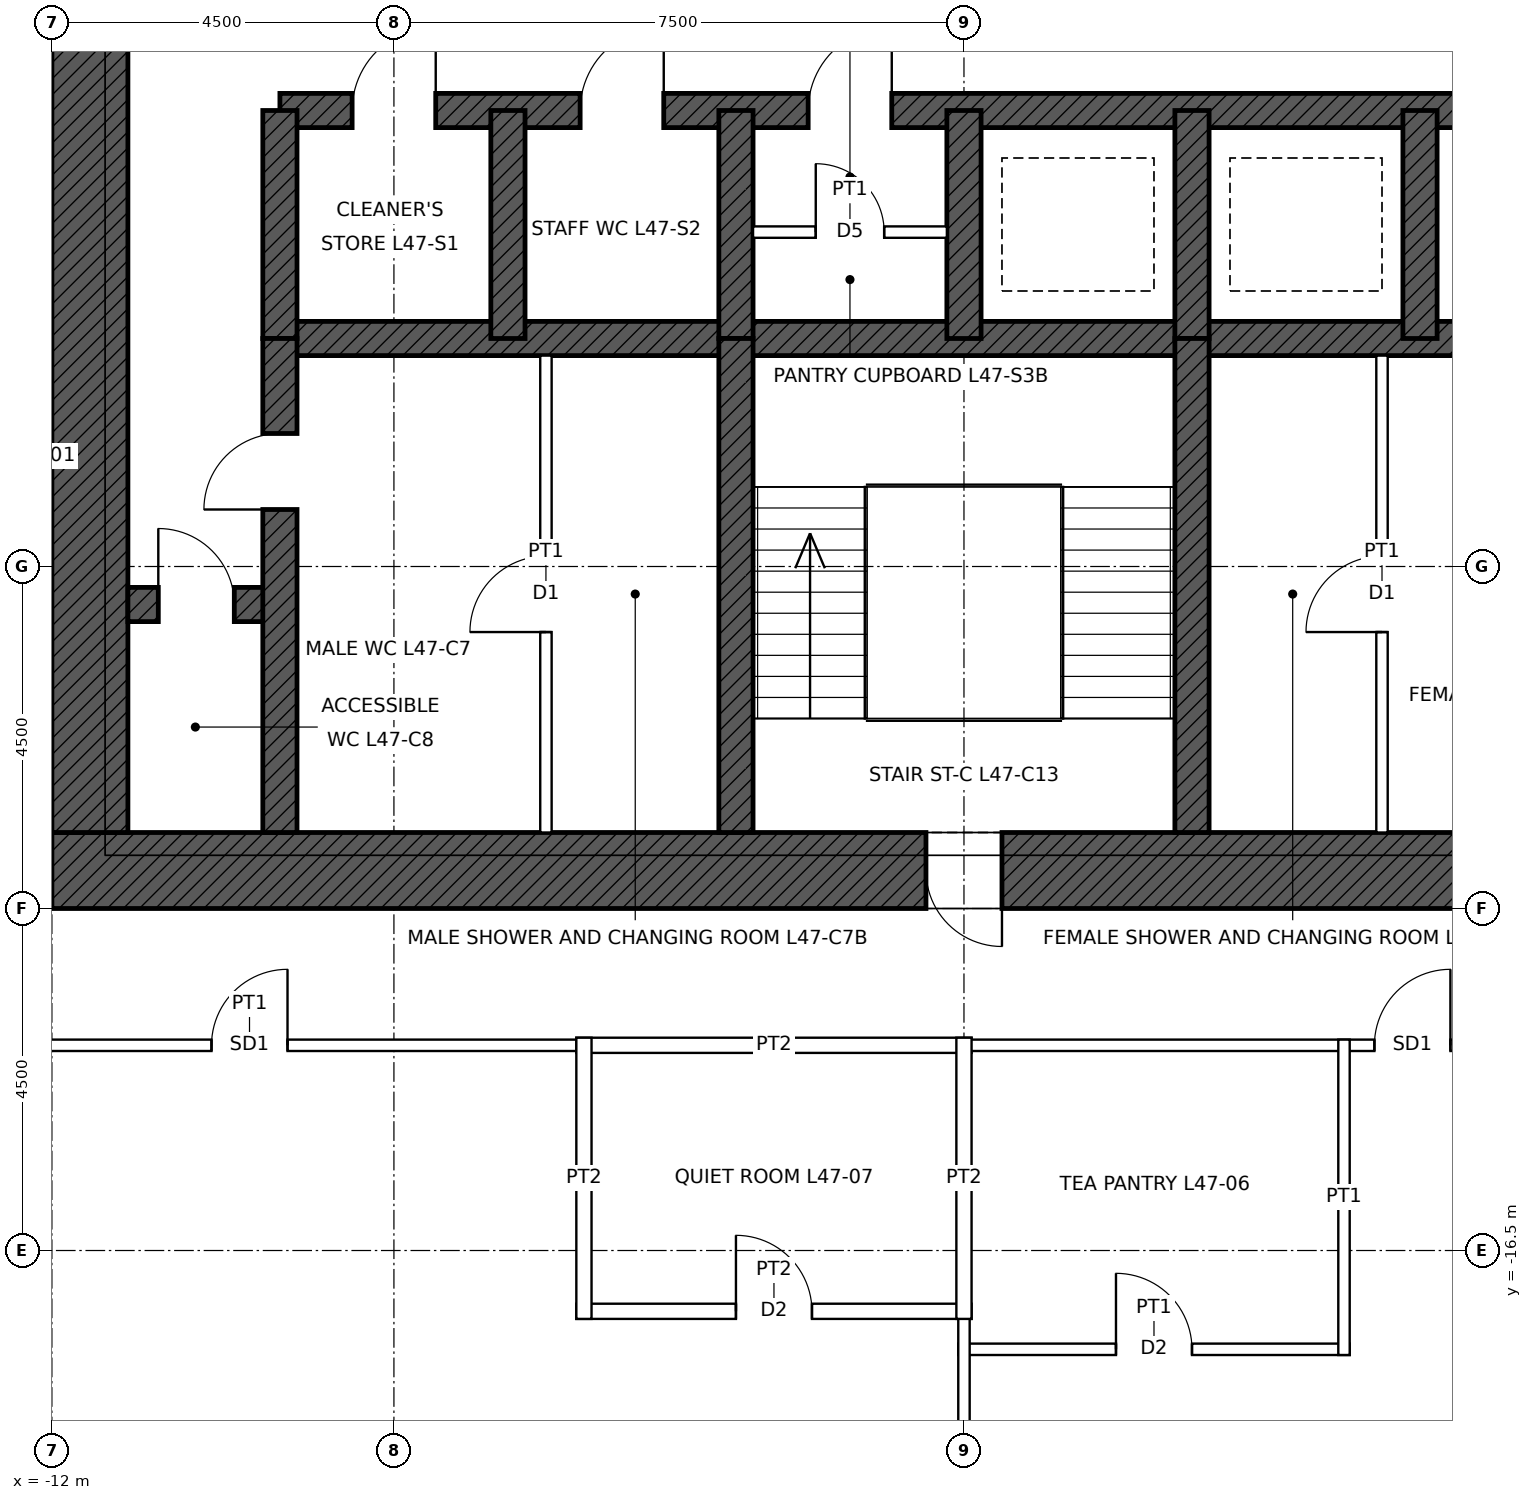
"""IFC4 building model, lengths in metres.
Left out: names, types, materials, properties, quantities, classifications, styles, units other than length and angle.
Written with IfcOpenShell. Run it as: python <this file> out.ifc"""

import sys

from ifc_helpers import new_model, si_unit, direction, frame, frame_2d, origin, place, context, subcontext, project, spatial, rectangle, extrude, element, fill, save


model = new_model("IFC4")
c1 = context("Model", 3, precision=1e-05, world=origin(), true_north=direction((0.0, 1.0)))
c2 = subcontext(c1, "Body", "Model", "MODEL_VIEW")
j1 = project(units=[si_unit("LENGTHUNIT", "METRE"), si_unit("PLANEANGLEUNIT", "RADIAN")], contexts=[c1])
p1 = place(None, origin())
s1 = spatial("IfcSite", under=j1, at=p1, CompositionType="ELEMENT")
p2 = place(p1, origin())
s2 = spatial("IfcBuilding", under=s1, at=p2, CompositionType="ELEMENT")
p3 = place(p2, frame((0.0, 0.0, 221.9)))
s3 = spatial("IfcBuildingStorey", under=s2, at=p3, CompositionType="ELEMENT", Elevation=221.9)
p4 = place(p3, frame((12.0, -11.5, 0.0), z_axis=(0.0, 0.0, 1.0), x_axis=(-1.0, 0.0, 0.0)))
e1 = element("IfcWall", 1, at=p4, inside=s3, PredefinedType="SHEAR", context=c2, shape_type="SweptSolid", body=[
    extrude(rectangle(XDim=24.0, YDim=1.0, at=frame_2d((12.0, 0.0))), origin(), (0.0, 0.0, 1.0), 4.0),
])
p5 = place(p4, frame((11.5, 0.0, 0.0)))
e2 = element("IfcOpeningElement", 2, at=p5, cuts=e1, PredefinedType="OPENING", context=c2, shape_type="SweptSolid", body=[
    extrude(rectangle(XDim=1.0, YDim=2.1, at=frame_2d((0.5, 1.05))), frame((0.0, 0.51, 0.0), z_axis=(0.0, -1.0, 0.0), x_axis=(1.0, 0.0, 0.0)), (0.0, 0.0, 1.0), 1.02),
])
p6 = place(p4, frame((1.0, 0.0, 0.0)))
e3 = element("IfcOpeningElement", 3, at=p6, cuts=e1, PredefinedType="OPENING", context=c2, shape_type="SweptSolid", body=[
    extrude(rectangle(XDim=1.0, YDim=2.4, at=frame_2d((0.5, 1.2))), frame((0.0, 0.51, 0.0), z_axis=(0.0, -1.0, 0.0), x_axis=(1.0, 0.0, 0.0)), (0.0, 0.0, 1.0), 1.02),
])
p7 = place(p3, frame((-11.5, -11.0, 0.0), z_axis=(0.0, 0.0, 1.0), x_axis=(0.0, 1.0, 0.0)))
e4 = element("IfcWall", 4, at=p7, inside=s3, PredefinedType="SHEAR", context=c2, shape_type="SweptSolid", body=[
    extrude(rectangle(XDim=22.0, YDim=1.0, at=frame_2d((11.0, 0.0))), origin(), (0.0, 0.0, 1.0), 4.0),
])
p8 = place(p7, frame((10.5, 0.0, 0.0)))
e5 = element("IfcOpeningElement", 5, at=p8, cuts=e4, PredefinedType="OPENING", context=c2, shape_type="SweptSolid", body=[
    extrude(rectangle(XDim=1.0, YDim=2.4, at=frame_2d((0.5, 1.2))), frame((0.0, 0.51, 0.0), z_axis=(0.0, -1.0, 0.0), x_axis=(1.0, 0.0, 0.0)), (0.0, 0.0, 1.0), 1.02),
])
p9 = place(p3, frame((-9.0, -1.5, 0.0), z_axis=(0.0, 0.0, 1.0), x_axis=(1.0, 0.0, 0.0)))
e6 = element("IfcWall", 6, at=p9, inside=s3, PredefinedType="SHEAR", context=c2, shape_type="SweptSolid", body=[
    extrude(rectangle(XDim=18.0, YDim=0.45, at=frame_2d((9.0, 0.0))), origin(), (0.0, 0.0, 1.0), 4.0),
])
p10 = place(p9, frame((0.95, 0.0, 0.0)))
e7 = element("IfcOpeningElement", 7, at=p10, cuts=e6, PredefinedType="OPENING", context=c2, shape_type="SweptSolid", body=[
    extrude(rectangle(XDim=1.1, YDim=2.1, at=frame_2d((0.55, 1.05))), frame((0.0, 0.235, 0.0), z_axis=(0.0, -1.0, 0.0), x_axis=(1.0, 0.0, 0.0)), (0.0, 0.0, 1.0), 0.47),
])
p11 = place(p9, frame((3.95, 0.0, 0.0)))
e8 = element("IfcOpeningElement", 8, at=p11, cuts=e6, PredefinedType="OPENING", context=c2, shape_type="SweptSolid", body=[
    extrude(rectangle(XDim=1.1, YDim=2.1, at=frame_2d((0.55, 1.05))), frame((0.0, 0.235, 0.0), z_axis=(0.0, -1.0, 0.0), x_axis=(1.0, 0.0, 0.0)), (0.0, 0.0, 1.0), 0.47),
])
p12 = place(p9, frame((6.95, 0.0, 0.0)))
e9 = element("IfcOpeningElement", 9, at=p12, cuts=e6, PredefinedType="OPENING", context=c2, shape_type="SweptSolid", body=[
    extrude(rectangle(XDim=1.1, YDim=2.1, at=frame_2d((0.55, 1.05))), frame((0.0, 0.235, 0.0), z_axis=(0.0, -1.0, 0.0), x_axis=(1.0, 0.0, 0.0)), (0.0, 0.0, 1.0), 0.47),
])
p13 = place(p3, frame((-9.0, -4.5, 0.0), z_axis=(0.0, 0.0, 1.0), x_axis=(1.0, 0.0, 0.0)))
e10 = element("IfcWall", 10, at=p13, inside=s3, PredefinedType="SHEAR", context=c2, shape_type="SweptSolid", body=[
    extrude(rectangle(XDim=18.0, YDim=0.45, at=frame_2d((9.0, 0.0))), origin(), (0.0, 0.0, 1.0), 4.0),
])
p14 = place(p3, frame((-11.0, -8.0, 0.0), z_axis=(0.0, 0.0, 1.0), x_axis=(1.0, 0.0, 0.0)))
e11 = element("IfcWall", 11, at=p14, inside=s3, PredefinedType="SHEAR", context=c2, shape_type="SweptSolid", body=[
    extrude(rectangle(XDim=2.0, YDim=0.45, at=frame_2d((1.0, 0.0))), origin(), (0.0, 0.0, 1.0), 4.0),
])
p15 = place(p14, frame((0.4, 0.0, 0.0)))
e12 = element("IfcOpeningElement", 12, at=p15, cuts=e11, PredefinedType="OPENING", context=c2, shape_type="SweptSolid", body=[
    extrude(rectangle(XDim=1.0, YDim=2.1, at=frame_2d((0.5, 1.05))), frame((0.0, 0.235, 0.0), z_axis=(0.0, -1.0, 0.0), x_axis=(1.0, 0.0, 0.0)), (0.0, 0.0, 1.0), 0.47),
])
for number, where, z_axis, x_axis in (
    (13, (-9.0, -4.5, 0.0), (0.0, 0.0, 1.0), (0.0, 1.0, 0.0)),
    (14, (-6.0, -4.5, 0.0), (0.0, 0.0, 1.0), (0.0, 1.0, 0.0)),
    (15, (-3.0, -4.5, 0.0), (0.0, 0.0, 1.0), (0.0, 1.0, 0.0)),
    (16, (0.0, -4.5, 0.0), (0.0, 0.0, 1.0), (0.0, 1.0, 0.0)),
    (17, (3.0, -4.5, 0.0), (0.0, 0.0, 1.0), (0.0, 1.0, 0.0)),
    (18, (6.0, -4.5, 0.0), (0.0, 0.0, 1.0), (0.0, 1.0, 0.0)),
):
    element("IfcWall", number, at=place(p3, frame(where, z_axis=z_axis, x_axis=x_axis)), inside=s3, PredefinedType="SHEAR", context=c2, shape_type="SweptSolid", body=[
        extrude(rectangle(XDim=3.0, YDim=0.45, at=frame_2d((1.5, 0.0))), origin(), (0.0, 0.0, 1.0), 4.0),
    ])
p16 = place(p3, frame((-9.0, -11.0, 0.0), z_axis=(0.0, 0.0, 1.0), x_axis=(0.0, 1.0, 0.0)))
e19 = element("IfcWall", 19, at=p16, inside=s3, PredefinedType="SHEAR", context=c2, shape_type="SweptSolid", body=[
    extrude(rectangle(XDim=6.5, YDim=0.45, at=frame_2d((3.25, 0.0))), origin(), (0.0, 0.0, 1.0), 4.0),
])
p17 = place(p16, frame((4.25, 0.0, 0.0)))
e20 = element("IfcOpeningElement", 20, at=p17, cuts=e19, PredefinedType="OPENING", context=c2, shape_type="SweptSolid", body=[
    extrude(rectangle(XDim=1.0, YDim=2.1, at=frame_2d((0.5, 1.05))), frame((0.0, 0.235, 0.0), z_axis=(0.0, -1.0, 0.0), x_axis=(1.0, 0.0, 0.0)), (0.0, 0.0, 1.0), 0.47),
])
for number, where, z_axis, x_axis in (
    (21, (-3.0, -11.0, 0.0), (0.0, 0.0, 1.0), (0.0, 1.0, 0.0)),
    (22, (3.0, -11.0, 0.0), (0.0, 0.0, 1.0), (0.0, 1.0, 0.0)),
):
    element("IfcWall", number, at=place(p3, frame(where, z_axis=z_axis, x_axis=x_axis)), inside=s3, PredefinedType="SHEAR", context=c2, shape_type="SweptSolid", body=[
        extrude(rectangle(XDim=6.5, YDim=0.45, at=frame_2d((3.25, 0.0))), origin(), (0.0, 0.0, 1.0), 4.0),
    ])
p18 = place(p3, frame((-0.075, -17.8, 0.0), z_axis=(0.0, 0.0, 1.0), x_axis=(1.0, 0.0, 0.0)))
e23 = element("IfcWall", 23, at=p18, inside=s3, PredefinedType="PARTITIONING", context=c2, shape_type="SweptSolid", body=[
    extrude(rectangle(XDim=5.15, YDim=0.15, at=frame_2d((2.575, 0.0))), origin(), (0.0, 0.0, 1.0), 3.85),
])
p19 = place(p18, frame((2.075, 0.0, 0.0)))
e24 = element("IfcOpeningElement", 24, at=p19, cuts=e23, PredefinedType="OPENING", context=c2, shape_type="SweptSolid", body=[
    extrude(rectangle(XDim=1.0, YDim=2.1, at=frame_2d((0.5, 1.05))), frame((0.0, 0.085, 0.0), z_axis=(0.0, -1.0, 0.0), x_axis=(1.0, 0.0, 0.0)), (0.0, 0.0, 1.0), 0.17),
])
p20 = place(p3, frame((-5.1, -17.3, 0.0), z_axis=(0.0, 0.0, 1.0), x_axis=(1.0, 0.0, 0.0)))
e25 = element("IfcWall", 25, at=p20, inside=s3, PredefinedType="PARTITIONING", context=c2, shape_type="SweptSolid", body=[
    extrude(rectangle(XDim=5.2, YDim=0.2, at=frame_2d((2.6, 0.0))), origin(), (0.0, 0.0, 1.0), 3.85),
])
p21 = place(p20, frame((2.1, 0.0, 0.0)))
e26 = element("IfcOpeningElement", 26, at=p21, cuts=e25, PredefinedType="OPENING", context=c2, shape_type="SweptSolid", body=[
    extrude(rectangle(XDim=1.0, YDim=2.1, at=frame_2d((0.5, 1.05))), frame((0.0, 0.11, 0.0), z_axis=(0.0, -1.0, 0.0), x_axis=(1.0, 0.0, 0.0)), (0.0, 0.0, 1.0), 0.22),
])
p22 = place(p3, frame((-13.875, -13.8, 0.0), z_axis=(0.0, 0.0, 1.0), x_axis=(1.0, 0.0, 0.0)))
e27 = element("IfcWall", 27, at=p22, inside=s3, PredefinedType="PARTITIONING", context=c2, shape_type="SweptSolid", body=[
    extrude(rectangle(XDim=8.95, YDim=0.15, at=frame_2d((4.475, 0.0))), origin(), (0.0, 0.0, 1.0), 3.85),
])
p23 = place(p22, frame((3.975, 0.0, 0.0)))
e28 = element("IfcOpeningElement", 28, at=p23, cuts=e27, PredefinedType="OPENING", context=c2, shape_type="SweptSolid", body=[
    extrude(rectangle(XDim=1.0, YDim=2.4, at=frame_2d((0.5, 1.2))), frame((0.0, 0.085, 0.0), z_axis=(0.0, -1.0, 0.0), x_axis=(1.0, 0.0, 0.0)), (0.0, 0.0, 1.0), 0.17),
])
p24 = place(p3, frame((-5.1, -13.8, 0.0), z_axis=(0.0, 0.0, 1.0), x_axis=(1.0, 0.0, 0.0)))
e29 = element("IfcWall", 29, at=p24, inside=s3, PredefinedType="PARTITIONING", context=c2, shape_type="SweptSolid", body=[
    extrude(rectangle(XDim=5.2, YDim=0.2, at=frame_2d((2.6, 0.0))), origin(), (0.0, 0.0, 1.0), 3.85),
])
p25 = place(p3, frame((-0.075, -13.8, 0.0), z_axis=(0.0, 0.0, 1.0), x_axis=(1.0, 0.0, 0.0)))
e30 = element("IfcWall", 30, at=p25, inside=s3, PredefinedType="PARTITIONING", context=c2, shape_type="SweptSolid", body=[
    extrude(rectangle(XDim=13.95, YDim=0.15, at=frame_2d((6.975, 0.0))), origin(), (0.0, 0.0, 1.0), 3.85),
])
p26 = place(p25, frame((5.475, 0.0, 0.0)))
e31 = element("IfcOpeningElement", 31, at=p26, cuts=e30, PredefinedType="OPENING", context=c2, shape_type="SweptSolid", body=[
    extrude(rectangle(XDim=1.0, YDim=2.4, at=frame_2d((0.5, 1.2))), frame((0.0, 0.085, 0.0), z_axis=(0.0, -1.0, 0.0), x_axis=(1.0, 0.0, 0.0)), (0.0, 0.0, 1.0), 0.17),
])
p27 = place(p3, frame((-5.0, -17.4, 0.0), z_axis=(0.0, 0.0, 1.0), x_axis=(0.0, 1.0, 0.0)))
e32 = element("IfcWall", 32, at=p27, inside=s3, PredefinedType="PARTITIONING", context=c2, shape_type="SweptSolid", body=[
    extrude(rectangle(XDim=3.7, YDim=0.2, at=frame_2d((1.85, 0.0))), origin(), (0.0, 0.0, 1.0), 3.85),
])
p28 = place(p3, frame((0.0, -20.99, 0.0), z_axis=(0.0, 0.0, 1.0), x_axis=(0.0, 1.0, 0.0)))
e33 = element("IfcWall", 33, at=p28, inside=s3, PredefinedType="PARTITIONING", context=c2, shape_type="SweptSolid", body=[
    extrude(rectangle(XDim=3.765, YDim=0.15, at=frame_2d((1.882, 0.0))), origin(), (0.0, 0.0, 1.0), 3.238),
])
p29 = place(p3, frame((0.0, -17.4, 0.0), z_axis=(0.0, 0.0, 1.0), x_axis=(0.0, 1.0, 0.0)))
e34 = element("IfcWall", 34, at=p29, inside=s3, PredefinedType="PARTITIONING", context=c2, shape_type="SweptSolid", body=[
    extrude(rectangle(XDim=3.7, YDim=0.2, at=frame_2d((1.85, 0.0))), origin(), (0.0, 0.0, 1.0), 3.238),
])
p30 = place(p3, frame((5.0, -17.875, 0.0), z_axis=(0.0, 0.0, 1.0), x_axis=(0.0, 1.0, 0.0)))
e35 = element("IfcWall", 35, at=p30, inside=s3, PredefinedType="PARTITIONING", context=c2, shape_type="SweptSolid", body=[
    extrude(rectangle(XDim=4.15, YDim=0.15, at=frame_2d((2.075, 0.0))), origin(), (0.0, 0.0, 1.0), 3.85),
])
p31 = place(p3, frame((-5.5, -11.0, 0.0), z_axis=(0.0, 0.0, 1.0), x_axis=(0.0, 1.0, 0.0)))
e36 = element("IfcWall", 36, at=p31, inside=s3, PredefinedType="PARTITIONING", context=c2, shape_type="SweptSolid", body=[
    extrude(rectangle(XDim=6.275, YDim=0.15, at=frame_2d((3.137, 0.0))), origin(), (0.0, 0.0, 1.0), 3.75),
])
p32 = place(p31, frame((2.637, 0.0, 0.0)))
e37 = element("IfcOpeningElement", 37, at=p32, cuts=e36, PredefinedType="OPENING", context=c2, shape_type="SweptSolid", body=[
    extrude(rectangle(XDim=1.0, YDim=2.1, at=frame_2d((0.5, 1.05))), frame((0.0, 0.085, 0.0), z_axis=(0.0, -1.0, 0.0), x_axis=(1.0, 0.0, 0.0)), (0.0, 0.0, 1.0), 0.17),
])
p33 = place(p3, frame((5.5, -11.0, 0.0), z_axis=(0.0, 0.0, 1.0), x_axis=(0.0, 1.0, 0.0)))
e38 = element("IfcWall", 38, at=p33, inside=s3, PredefinedType="PARTITIONING", context=c2, shape_type="SweptSolid", body=[
    extrude(rectangle(XDim=6.275, YDim=0.15, at=frame_2d((3.137, 0.0))), origin(), (0.0, 0.0, 1.0), 3.75),
])
p34 = place(p33, frame((2.637, 0.0, 0.0)))
e39 = element("IfcOpeningElement", 39, at=p34, cuts=e38, PredefinedType="OPENING", context=c2, shape_type="SweptSolid", body=[
    extrude(rectangle(XDim=1.0, YDim=2.1, at=frame_2d((0.5, 1.05))), frame((0.0, 0.085, 0.0), z_axis=(0.0, -1.0, 0.0), x_axis=(1.0, 0.0, 0.0)), (0.0, 0.0, 1.0), 0.17),
])
p35 = place(p3, frame((-2.775, -3.1, 0.0), z_axis=(0.0, 0.0, 1.0), x_axis=(1.0, 0.0, 0.0)))
e40 = element("IfcWall", 40, at=p35, inside=s3, PredefinedType="PARTITIONING", context=c2, shape_type="SweptSolid", body=[
    extrude(rectangle(XDim=2.55, YDim=0.15, at=frame_2d((1.275, 0.0))), origin(), (0.0, 0.0, 1.0), 3.75),
])
p36 = place(p35, frame((0.825, 0.0, 0.0)))
e41 = element("IfcOpeningElement", 41, at=p36, cuts=e40, PredefinedType="OPENING", context=c2, shape_type="SweptSolid", body=[
    extrude(rectangle(XDim=0.9, YDim=2.1, at=frame_2d((0.45, 1.05))), frame((0.0, 0.085, 0.0), z_axis=(0.0, -1.0, 0.0), x_axis=(1.0, 0.0, 0.0)), (0.0, 0.0, 1.0), 0.17),
])
p37 = place(p5, origin())
e42 = element("IfcDoor", 42, at=p37, inside=s3, OperationType="SINGLE_SWING_LEFT", PredefinedType="DOOR", context=c2, shape_type="SweptSolid", body=[
    extrude(rectangle(XDim=1.0, YDim=2.1, at=frame_2d((0.5, 1.05))), frame((0.0, 0.485, 0.0), z_axis=(0.0, -1.0, 0.0), x_axis=(1.0, 0.0, 0.0)), (0.0, 0.0, 1.0), 0.05),
])
fill(e2, e42)
p38 = place(p17, origin())
e43 = element("IfcDoor", 43, at=p38, inside=s3, OperationType="SINGLE_SWING_LEFT", PredefinedType="DOOR", context=c2, shape_type="SweptSolid", body=[
    extrude(rectangle(XDim=1.0, YDim=2.1, at=frame_2d((0.5, 1.05))), frame((0.0, 0.025, 0.0), z_axis=(0.0, -1.0, 0.0), x_axis=(1.0, 0.0, 0.0)), (0.0, 0.0, 1.0), 0.05),
])
fill(e20, e43)
p39 = place(p15, origin())
e44 = element("IfcDoor", 44, at=p39, inside=s3, OperationType="SINGLE_SWING_LEFT", PredefinedType="DOOR", context=c2, shape_type="SweptSolid", body=[
    extrude(rectangle(XDim=1.0, YDim=2.1, at=frame_2d((0.5, 1.05))), frame((0.0, 0.025, 0.0), z_axis=(0.0, -1.0, 0.0), x_axis=(1.0, 0.0, 0.0)), (0.0, 0.0, 1.0), 0.05),
])
fill(e12, e44)
p40 = place(p32, origin())
e45 = element("IfcDoor", 45, at=p40, inside=s3, OperationType="SINGLE_SWING_LEFT", PredefinedType="DOOR", context=c2, shape_type="SweptSolid", body=[
    extrude(rectangle(XDim=1.0, YDim=2.1, at=frame_2d((0.5, 1.05))), frame((0.0, 0.025, 0.0), z_axis=(0.0, -1.0, 0.0), x_axis=(1.0, 0.0, 0.0)), (0.0, 0.0, 1.0), 0.05),
])
fill(e37, e45)
p41 = place(p34, origin())
e46 = element("IfcDoor", 46, at=p41, inside=s3, OperationType="SINGLE_SWING_LEFT", PredefinedType="DOOR", context=c2, shape_type="SweptSolid", body=[
    extrude(rectangle(XDim=1.0, YDim=2.1, at=frame_2d((0.5, 1.05))), frame((0.0, 0.025, 0.0), z_axis=(0.0, -1.0, 0.0), x_axis=(1.0, 0.0, 0.0)), (0.0, 0.0, 1.0), 0.05),
])
fill(e39, e46)
p42 = place(p10, origin())
e47 = element("IfcDoor", 47, at=p42, inside=s3, OperationType="SINGLE_SWING_RIGHT", PredefinedType="DOOR", context=c2, shape_type="SweptSolid", body=[
    extrude(rectangle(XDim=1.1, YDim=2.1, at=frame_2d((0.55, 1.05))), frame((0.0, 0.025, 0.0), z_axis=(0.0, -1.0, 0.0), x_axis=(1.0, 0.0, 0.0)), (0.0, 0.0, 1.0), 0.05),
])
fill(e7, e47)
p43 = place(p11, origin())
e48 = element("IfcDoor", 48, at=p43, inside=s3, OperationType="SINGLE_SWING_RIGHT", PredefinedType="DOOR", context=c2, shape_type="SweptSolid", body=[
    extrude(rectangle(XDim=1.1, YDim=2.1, at=frame_2d((0.55, 1.05))), frame((0.0, 0.025, 0.0), z_axis=(0.0, -1.0, 0.0), x_axis=(1.0, 0.0, 0.0)), (0.0, 0.0, 1.0), 0.05),
])
fill(e8, e48)
p44 = place(p12, origin())
e49 = element("IfcDoor", 49, at=p44, inside=s3, OperationType="SINGLE_SWING_RIGHT", PredefinedType="DOOR", context=c2, shape_type="SweptSolid", body=[
    extrude(rectangle(XDim=1.1, YDim=2.1, at=frame_2d((0.55, 1.05))), frame((0.0, 0.025, 0.0), z_axis=(0.0, -1.0, 0.0), x_axis=(1.0, 0.0, 0.0)), (0.0, 0.0, 1.0), 0.05),
])
fill(e9, e49)
p45 = place(p36, origin())
e50 = element("IfcDoor", 50, at=p45, inside=s3, OperationType="SINGLE_SWING_LEFT", PredefinedType="DOOR", context=c2, shape_type="SweptSolid", body=[
    extrude(rectangle(XDim=0.9, YDim=2.1, at=frame_2d((0.45, 1.05))), frame((0.0, 0.025, 0.0), z_axis=(0.0, -1.0, 0.0), x_axis=(1.0, 0.0, 0.0)), (0.0, 0.0, 1.0), 0.05),
])
fill(e41, e50)
p46 = place(p19, origin())
e51 = element("IfcDoor", 51, at=p46, inside=s3, OperationType="SINGLE_SWING_LEFT", PredefinedType="DOOR", context=c2, shape_type="SweptSolid", body=[
    extrude(rectangle(XDim=1.0, YDim=2.1, at=frame_2d((0.5, 1.05))), frame((0.0, 0.025, 0.0), z_axis=(0.0, -1.0, 0.0), x_axis=(1.0, 0.0, 0.0)), (0.0, 0.0, 1.0), 0.05),
])
fill(e24, e51)
p47 = place(p21, origin())
e52 = element("IfcDoor", 52, at=p47, inside=s3, OperationType="SINGLE_SWING_LEFT", PredefinedType="DOOR", context=c2, shape_type="SweptSolid", body=[
    extrude(rectangle(XDim=1.0, YDim=2.1, at=frame_2d((0.5, 1.05))), frame((0.0, 0.025, 0.0), z_axis=(0.0, -1.0, 0.0), x_axis=(1.0, 0.0, 0.0)), (0.0, 0.0, 1.0), 0.05),
])
fill(e26, e52)
p48 = place(p23, origin())
e53 = element("IfcDoor", 53, at=p48, inside=s3, OperationType="SINGLE_SWING_RIGHT", PredefinedType="DOOR", context=c2, shape_type="SweptSolid", body=[
    extrude(rectangle(XDim=1.0, YDim=2.4, at=frame_2d((0.5, 1.2))), frame((0.0, 0.025, 0.0), z_axis=(0.0, -1.0, 0.0), x_axis=(1.0, 0.0, 0.0)), (0.0, 0.0, 1.0), 0.05),
])
fill(e28, e53)
p49 = place(p26, origin())
e54 = element("IfcDoor", 54, at=p49, inside=s3, OperationType="SINGLE_SWING_RIGHT", PredefinedType="DOOR", context=c2, shape_type="SweptSolid", body=[
    extrude(rectangle(XDim=1.0, YDim=2.4, at=frame_2d((0.5, 1.2))), frame((0.0, 0.025, 0.0), z_axis=(0.0, -1.0, 0.0), x_axis=(1.0, 0.0, 0.0)), (0.0, 0.0, 1.0), 0.05),
])
fill(e31, e54)
save(model, sys.argv[1])
